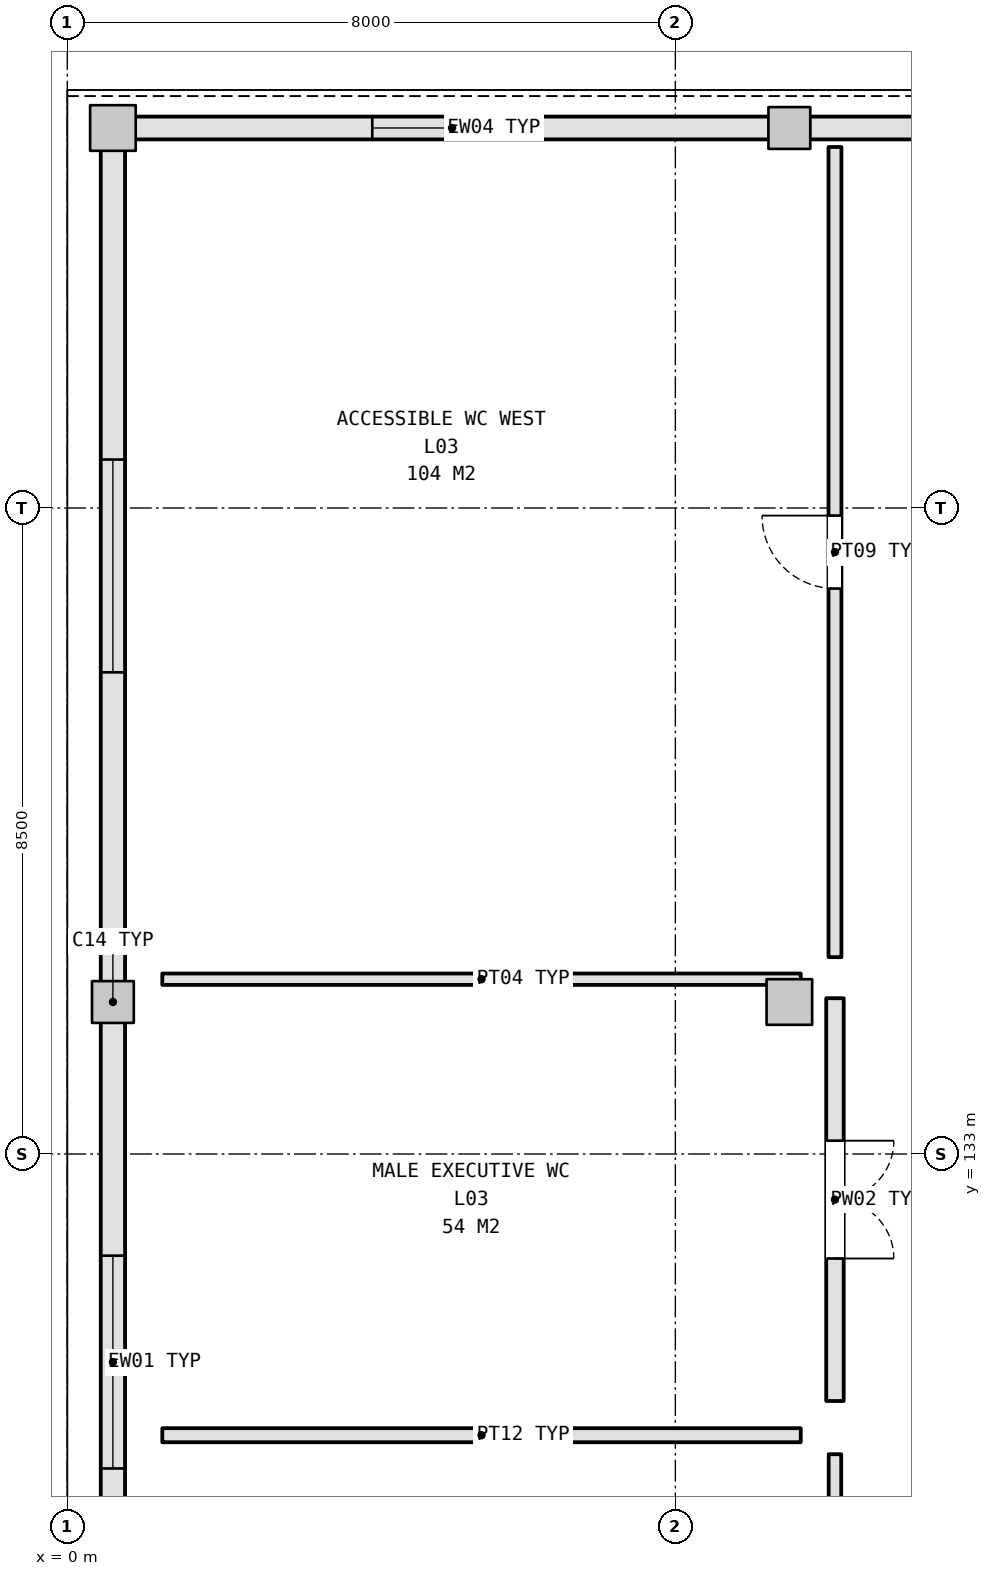
"""IFC4 building model, lengths in metres.
Left out: names, types, materials, properties, quantities, classifications, styles, units other than length and angle.
Written with IfcOpenShell. Run it as: python <this file> out.ifc"""

import sys

from ifc_helpers import new_model, si_unit, direction, frame, frame_2d, origin, origin_2d, place, context, subcontext, project, spatial, rectangle, extrude, element, fill, save


model = new_model("IFC4")
c1 = context("Model", 3, precision=1e-05, world=origin(), true_north=direction((0.0, 1.0)))
c2 = subcontext(c1, "Body", "Model", "MODEL_VIEW")
j1 = project(units=[si_unit("LENGTHUNIT", "METRE"), si_unit("PLANEANGLEUNIT", "RADIAN")], contexts=[c1])
p1 = place(None, origin())
s1 = spatial("IfcSite", under=j1, at=p1, CompositionType="ELEMENT")
p2 = place(p1, origin())
s2 = spatial("IfcBuilding", under=s1, at=p2, CompositionType="ELEMENT")
p3 = place(p2, frame((0.0, 0.0, 16.2)))
s3 = spatial("IfcBuildingStorey", under=s2, at=p3, CompositionType="ELEMENT", Elevation=16.2)
p4 = place(p3, frame((0.6, 135.0, 0.0), z_axis=(0.0, 0.0, 1.0), x_axis=(1.0, 0.0, 0.0)))
e1 = element("IfcColumn", 1, at=p4, inside=s3, PredefinedType="COLUMN", context=c2, shape_type="SweptSolid", body=[
    extrude(rectangle(XDim=0.55, YDim=0.55, at=origin_2d()), origin(), (0.0, 0.0, 1.0), 5.4),
])
for number, where, z_axis, x_axis in (
    (2, (0.6, 146.5, 0.0), (0.0, 0.0, 1.0), (1.0, 0.0, 0.0)),
    (3, (9.5, 135.0, 0.0), (0.0, 0.0, 1.0), (1.0, 0.0, 0.0)),
):
    element("IfcColumn", number, at=place(p3, frame(where, z_axis=z_axis, x_axis=x_axis)), inside=s3, PredefinedType="COLUMN", context=c2, shape_type="SweptSolid", body=[
        extrude(rectangle(XDim=0.6, YDim=0.6, at=origin_2d()), origin(), (0.0, 0.0, 1.0), 5.4),
    ])
p5 = place(p3, frame((9.5, 146.5, 0.0), z_axis=(0.0, 0.0, 1.0), x_axis=(1.0, 0.0, 0.0)))
e4 = element("IfcColumn", 4, at=p5, inside=s3, PredefinedType="COLUMN", context=c2, shape_type="SweptSolid", body=[
    extrude(rectangle(XDim=0.55, YDim=0.55, at=origin_2d()), origin(), (0.0, 0.0, 1.0), 5.4),
])
p6 = place(p3, frame((0.6, 125.788, 0.0), z_axis=(0.0, 0.0, 1.0), x_axis=(0.0, 1.0, 0.0)))
e5 = element("IfcWall", 5, at=p6, inside=s3, PredefinedType="SOLIDWALL", context=c2, shape_type="SweptSolid", body=[
    extrude(rectangle(XDim=8.949, YDim=0.32, at=frame_2d((4.475, 0.0))), origin(), (0.0, 0.0, 1.0), 4.475),
])
p7 = place(p6, frame((3.074, 0.0, 1.05)))
e6 = element("IfcOpeningElement", 6, at=p7, cuts=e5, PredefinedType="OPENING", context=c2, shape_type="SweptSolid", body=[
    extrude(rectangle(XDim=2.8, YDim=1.4, at=frame_2d((1.4, 0.7))), frame((0.0, 0.17, 0.0), z_axis=(0.0, -1.0, 0.0), x_axis=(1.0, 0.0, 0.0)), (0.0, 0.0, 1.0), 0.34),
])
p8 = place(p3, frame((0.6, 135.263, 0.0), z_axis=(0.0, 0.0, 1.0), x_axis=(0.0, 1.0, 0.0)))
e7 = element("IfcWall", 7, at=p8, inside=s3, PredefinedType="SOLIDWALL", context=c2, shape_type="SweptSolid", body=[
    extrude(rectangle(XDim=10.949, YDim=0.32, at=frame_2d((5.475, 0.0))), origin(), (0.0, 0.0, 1.0), 4.465),
])
p9 = place(p8, frame((4.074, 0.0, 1.05)))
e8 = element("IfcOpeningElement", 8, at=p9, cuts=e7, PredefinedType="OPENING", context=c2, shape_type="SweptSolid", body=[
    extrude(rectangle(XDim=2.8, YDim=1.4, at=frame_2d((1.4, 0.7))), frame((0.0, 0.17, 0.0), z_axis=(0.0, -1.0, 0.0), x_axis=(1.0, 0.0, 0.0)), (0.0, 0.0, 1.0), 0.34),
])
p10 = place(p3, frame((0.888, 146.5, 0.0), z_axis=(0.0, 0.0, 1.0), x_axis=(1.0, 0.0, 0.0)))
e9 = element("IfcWall", 9, at=p10, inside=s3, PredefinedType="SOLIDWALL", context=c2, shape_type="SweptSolid", body=[
    extrude(rectangle(XDim=8.349, YDim=0.3, at=frame_2d((4.175, 0.0))), origin(), (0.0, 0.0, 1.0), 4.465),
])
p11 = place(p10, frame((3.125, 0.0, 1.05)))
e10 = element("IfcOpeningElement", 10, at=p11, cuts=e9, PredefinedType="OPENING", context=c2, shape_type="SweptSolid", body=[
    extrude(rectangle(XDim=2.1, YDim=2.1, at=frame_2d((1.05, 1.05))), frame((0.0, 0.16, 0.0), z_axis=(0.0, -1.0, 0.0), x_axis=(1.0, 0.0, 0.0)), (0.0, 0.0, 1.0), 0.32),
])
p12 = place(p3, frame((9.763, 146.5, 0.0), z_axis=(0.0, 0.0, 1.0), x_axis=(1.0, 0.0, 0.0)))
e11 = element("IfcWall", 11, at=p12, inside=s3, PredefinedType="SOLIDWALL", context=c2, shape_type="SweptSolid", body=[
    extrude(rectangle(XDim=8.349, YDim=0.3, at=frame_2d((4.175, 0.0))), origin(), (0.0, 0.0, 1.0), 4.465),
])
p13 = place(p12, frame((3.125, 0.0, 1.05)))
e12 = element("IfcOpeningElement", 12, at=p13, cuts=e11, PredefinedType="OPENING", context=c2, shape_type="SweptSolid", body=[
    extrude(rectangle(XDim=2.1, YDim=2.1, at=frame_2d((1.05, 1.05))), frame((0.0, 0.16, 0.0), z_axis=(0.0, -1.0, 0.0), x_axis=(1.0, 0.0, 0.0)), (0.0, 0.0, 1.0), 0.32),
])
p14 = place(p3, frame((10.1, 129.05, 0.0), z_axis=(0.0, 0.0, 1.0), x_axis=(0.0, -1.0, 0.0)))
e13 = element("IfcWall", 13, at=p14, inside=s3, PredefinedType="PARTITIONING", context=c2, shape_type="SweptSolid", body=[
    extrude(rectangle(XDim=8.3, YDim=0.165, at=frame_2d((4.15, 0.0))), origin(), (0.0, 0.0, 1.0), 4.668),
])
p15 = place(p14, frame((4.41, 0.0, 0.0)))
e14 = element("IfcOpeningElement", 14, at=p15, cuts=e13, PredefinedType="OPENING", context=c2, shape_type="SweptSolid", body=[
    extrude(rectangle(XDim=1.08, YDim=2.25, at=frame_2d((0.54, 1.125))), frame((0.0, 0.093, 0.0), z_axis=(0.0, -1.0, 0.0), x_axis=(1.0, 0.0, 0.0)), (0.0, 0.0, 1.0), 0.185),
])
p16 = place(p3, frame((1.25, 129.3, 0.0), z_axis=(0.0, 0.0, 1.0), x_axis=(1.0, 0.0, 0.0)))
e15 = element("IfcWall", 15, at=p16, inside=s3, PredefinedType="PARTITIONING", context=c2, shape_type="SweptSolid", body=[
    extrude(rectangle(XDim=8.4, YDim=0.185, at=frame_2d((4.2, 0.0))), origin(), (0.0, 0.0, 1.0), 4.465),
])
p17 = place(p3, frame((10.1, 135.05, 0.0), z_axis=(0.0, 0.0, 1.0), x_axis=(0.0, -1.0, 0.0)))
e16 = element("IfcWall", 16, at=p17, inside=s3, PredefinedType="PLUMBINGWALL", context=c2, shape_type="SweptSolid", body=[
    extrude(rectangle(XDim=5.3, YDim=0.23, at=frame_2d((2.65, 0.0))), origin(), (0.0, 0.0, 1.0), 4.658),
])
p18 = place(p17, frame((1.875, 0.0, 0.0)))
e17 = element("IfcOpeningElement", 17, at=p18, cuts=e16, PredefinedType="OPENING", context=c2, shape_type="SweptSolid", body=[
    extrude(rectangle(XDim=1.55, YDim=2.15, at=frame_2d((0.775, 1.075))), frame((0.0, 0.125, 0.0), z_axis=(0.0, -1.0, 0.0), x_axis=(1.0, 0.0, 0.0)), (0.0, 0.0, 1.0), 0.25),
])
p19 = place(p3, frame((1.25, 135.3, 0.0), z_axis=(0.0, 0.0, 1.0), x_axis=(1.0, 0.0, 0.0)))
e18 = element("IfcWall", 18, at=p19, inside=s3, PredefinedType="PARTITIONING", context=c2, shape_type="SweptSolid", body=[
    extrude(rectangle(XDim=8.4, YDim=0.15, at=frame_2d((4.2, 0.0))), origin(), (0.0, 0.0, 1.0), 4.465),
])
p20 = place(p3, frame((10.1, 146.25, 0.0), z_axis=(0.0, 0.0, 1.0), x_axis=(0.0, -1.0, 0.0)))
e19 = element("IfcWall", 19, at=p20, inside=s3, PredefinedType="PARTITIONING", context=c2, shape_type="SweptSolid", body=[
    extrude(rectangle(XDim=10.66, YDim=0.17, at=frame_2d((5.33, 0.0))), origin(), (0.0, 0.0, 1.0), 4.658),
])
p21 = place(p20, frame((4.85, 0.0, 0.0)))
e20 = element("IfcOpeningElement", 20, at=p21, cuts=e19, PredefinedType="OPENING", context=c2, shape_type="SweptSolid", body=[
    extrude(rectangle(XDim=0.96, YDim=2.15, at=frame_2d((0.48, 1.075))), frame((0.0, 0.095, 0.0), z_axis=(0.0, -1.0, 0.0), x_axis=(1.0, 0.0, 0.0)), (0.0, 0.0, 1.0), 0.19),
])
p22 = place(p7, origin())
e21 = element("IfcWindow", 21, at=p22, inside=s3, PartitioningType="SINGLE_PANEL", PredefinedType="WINDOW", context=c2, shape_type="SweptSolid", body=[
    extrude(rectangle(XDim=2.8, YDim=1.4, at=frame_2d((1.4, 0.7))), frame((0.0, 0.03, 0.0), z_axis=(0.0, -1.0, 0.0), x_axis=(1.0, 0.0, 0.0)), (0.0, 0.0, 1.0), 0.06),
])
fill(e6, e21)
p23 = place(p9, origin())
e22 = element("IfcWindow", 22, at=p23, inside=s3, PartitioningType="SINGLE_PANEL", PredefinedType="WINDOW", context=c2, shape_type="SweptSolid", body=[
    extrude(rectangle(XDim=2.8, YDim=1.4, at=frame_2d((1.4, 0.7))), frame((0.0, 0.03, 0.0), z_axis=(0.0, -1.0, 0.0), x_axis=(1.0, 0.0, 0.0)), (0.0, 0.0, 1.0), 0.06),
])
fill(e8, e22)
p24 = place(p11, origin())
e23 = element("IfcWindow", 23, at=p24, inside=s3, PartitioningType="SINGLE_PANEL", PredefinedType="WINDOW", context=c2, shape_type="SweptSolid", body=[
    extrude(rectangle(XDim=2.1, YDim=2.1, at=frame_2d((1.05, 1.05))), frame((0.0, 0.03, 0.0), z_axis=(0.0, -1.0, 0.0), x_axis=(1.0, 0.0, 0.0)), (0.0, 0.0, 1.0), 0.06),
])
fill(e10, e23)
p25 = place(p18, origin())
e24 = element("IfcDoor", 24, at=p25, inside=s3, OperationType="DOUBLE_DOOR_SINGLE_SWING", PredefinedType="DOOR", context=c2, shape_type="SweptSolid", body=[
    extrude(rectangle(XDim=1.55, YDim=2.15, at=frame_2d((0.775, 1.075))), frame((0.0, 0.025, 0.0), z_axis=(0.0, -1.0, 0.0), x_axis=(1.0, 0.0, 0.0)), (0.0, 0.0, 1.0), 0.05),
])
fill(e17, e24)
p26 = place(p21, frame((0.96, 0.0, 0.0), z_axis=(0.0, 0.0, 1.0), x_axis=(-1.0, 0.0, 0.0)))
e25 = element("IfcDoor", 25, at=p26, inside=s3, OperationType="SINGLE_SWING_LEFT", PredefinedType="DOOR", context=c2, shape_type="SweptSolid", body=[
    extrude(rectangle(XDim=0.96, YDim=2.15, at=frame_2d((0.48, 1.075))), frame((0.0, 0.025, 0.0), z_axis=(0.0, -1.0, 0.0), x_axis=(1.0, 0.0, 0.0)), (0.0, 0.0, 1.0), 0.05),
])
fill(e20, e25)
save(model, sys.argv[1])
